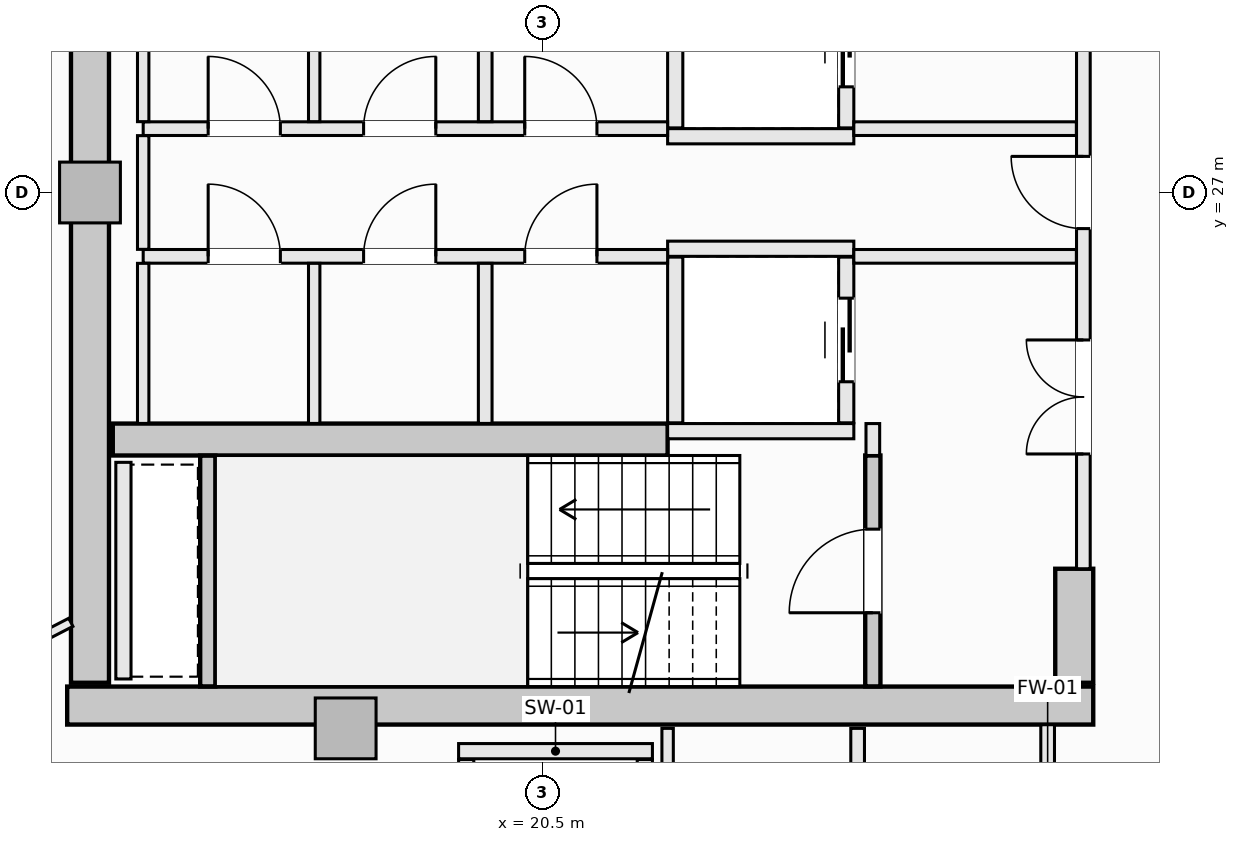
"""IFC4 building model, lengths in metres.
Left out: names, types, materials, properties, quantities, classifications, styles, units other than length and angle.
Written with IfcOpenShell. Run it as: python <this file> out.ifc"""

import sys

from ifc_helpers import new_model, si_unit, direction, frame, frame_2d, origin, origin_2d, place, context, subcontext, project, spatial, rectangle, extrude, element, fill, save


model = new_model("IFC4")
c1 = context("Model", 3, precision=1e-05, world=origin(), true_north=direction((0.0, 1.0)))
c2 = subcontext(c1, "Body", "Model", "MODEL_VIEW")
j1 = project(units=[si_unit("LENGTHUNIT", "METRE"), si_unit("PLANEANGLEUNIT", "RADIAN")], contexts=[c1])
p1 = place(None, origin())
s1 = spatial("IfcSite", under=j1, at=p1, CompositionType="ELEMENT")
p2 = place(p1, origin())
s2 = spatial("IfcBuilding", under=s1, at=p2, CompositionType="ELEMENT")
p3 = place(p2, frame((0.0, 0.0, 216.2)))
s3 = spatial("IfcBuildingStorey", under=s2, at=p3, CompositionType="ELEMENT", Elevation=216.2)
p4 = place(p3, frame((14.25, 20.25, -0.27), z_axis=(0.0, 0.0, 1.0), x_axis=(1.0, 0.0, 0.0)))
e1 = element("IfcWall", 1, at=p4, inside=s3, PredefinedType="SHEAR", context=c2, shape_type="SweptSolid", body=[
    extrude(rectangle(XDim=13.5, YDim=0.5, at=frame_2d((6.75, 0.0))), origin(), (0.0, 0.0, 1.0), 3.3),
])
p5 = place(p3, frame((14.55, 20.55, -0.27), z_axis=(0.0, 0.0, 1.0), x_axis=(0.0, 1.0, 0.0)))
e2 = element("IfcWall", 2, at=p5, inside=s3, PredefinedType="SHEAR", context=c2, shape_type="SweptSolid", body=[
    extrude(rectangle(XDim=12.9, YDim=0.5, at=frame_2d((6.45, 0.0))), origin(), (0.0, 0.0, 1.0), 3.3),
])
p6 = place(p3, frame((27.5, 20.55, -0.27), z_axis=(0.0, 0.0, 1.0), x_axis=(0.0, 1.0, 0.0)))
e3 = element("IfcWall", 3, at=p6, inside=s3, PredefinedType="SHEAR", context=c2, shape_type="SweptSolid", body=[
    extrude(rectangle(XDim=1.5, YDim=0.5, at=frame_2d((0.75, 0.0))), origin(), (0.0, 0.0, 1.0), 3.3),
])
p7 = place(p3, frame((14.85, 23.75, -0.27), z_axis=(0.0, 0.0, 1.0), x_axis=(1.0, 0.0, 0.0)))
e4 = element("IfcWall", 4, at=p7, inside=s3, PredefinedType="SHEAR", context=c2, shape_type="SweptSolid", body=[
    extrude(rectangle(XDim=7.3, YDim=0.42, at=frame_2d((3.65, 0.0))), origin(), (0.0, 0.0, 1.0), 3.3),
])
for number, where, z_axis, x_axis in (
    (5, (14.55, 27.0, -0.27), (0.0, 0.0, 1.0), (1.0, 0.0, 0.0)),
    (6, (17.914, 19.95, -0.27), (0.0, 0.0, 1.0), (1.0, 0.0, 0.0)),
):
    element("IfcColumn", number, at=place(p3, frame(where, z_axis=z_axis, x_axis=x_axis)), inside=s3, PredefinedType="PILASTER", context=c2, shape_type="SweptSolid", body=[
        extrude(rectangle(XDim=0.8, YDim=0.8, at=origin_2d()), origin(), (0.0, 0.0, 1.0), 3.3),
    ])
p8 = place(p3, frame((24.85, 20.502, -0.27), z_axis=(0.0, 0.0, 1.0), x_axis=(0.0, 1.0, 0.0)))
e7 = element("IfcWall", 7, at=p8, inside=s3, PredefinedType="SHEAR", context=c2, shape_type="SweptSolid", body=[
    extrude(rectangle(XDim=3.038, YDim=0.2, at=frame_2d((1.519, 0.0))), origin(), (0.0, 0.0, 1.0), 3.3),
])
p9 = place(p8, frame((0.969, 0.0, 0.27)))
e8 = element("IfcOpeningElement", 8, at=p9, cuts=e7, PredefinedType="OPENING", context=c2, shape_type="SweptSolid", body=[
    extrude(rectangle(XDim=1.1, YDim=2.15, at=frame_2d((0.55, 1.075))), frame((0.0, 0.11, 0.0), z_axis=(0.0, -1.0, 0.0), x_axis=(1.0, 0.0, 0.0)), (0.0, 0.0, 1.0), 0.22),
])
p10 = place(p3, frame((16.1, 20.502, -0.27), z_axis=(0.0, 0.0, 1.0), x_axis=(0.0, 1.0, 0.0)))
e9 = element("IfcWall", 9, at=p10, inside=s3, PredefinedType="SHEAR", context=c2, shape_type="SweptSolid", body=[
    extrude(rectangle(XDim=3.036, YDim=0.2, at=frame_2d((1.518, 0.0))), origin(), (0.0, 0.0, 1.0), 3.3),
])
p11 = place(p3, frame((22.15, 27.74, 0.0), z_axis=(0.0, 0.0, 1.0), x_axis=(1.0, 0.0, 0.0)))
e10 = element("IfcWall", 10, at=p11, inside=s3, PredefinedType="SOLIDWALL", context=c2, shape_type="SweptSolid", body=[
    extrude(rectangle(XDim=2.45, YDim=0.2, at=frame_2d((1.225, 0.0))), origin(), (0.0, 0.0, 1.0), 3.03),
])
p12 = place(p3, frame((22.25, 27.85, 0.0), z_axis=(0.0, 0.0, 1.0), x_axis=(0.0, 1.0, 0.0)))
e11 = element("IfcWall", 11, at=p12, inside=s3, PredefinedType="SOLIDWALL", context=c2, shape_type="SweptSolid", body=[
    extrude(rectangle(XDim=2.18, YDim=0.2, at=frame_2d((1.09, 0.0))), origin(), (0.0, 0.0, 1.0), 3.03),
])
p13 = place(p3, frame((24.5, 27.85, 0.0), z_axis=(0.0, 0.0, 1.0), x_axis=(0.0, 1.0, 0.0)))
e12 = element("IfcWall", 12, at=p13, inside=s3, PredefinedType="SOLIDWALL", context=c2, shape_type="SweptSolid", body=[
    extrude(rectangle(XDim=2.18, YDim=0.2, at=frame_2d((1.09, 0.0))), origin(), (0.0, 0.0, 1.0), 3.03),
])
p14 = place(p13, frame((0.54, 0.0, 0.0)))
e13 = element("IfcOpeningElement", 13, at=p14, cuts=e12, PredefinedType="OPENING", context=c2, shape_type="SweptSolid", body=[
    extrude(rectangle(XDim=1.1, YDim=2.2, at=frame_2d((0.55, 1.1))), frame((0.0, 0.11, 0.0), z_axis=(0.0, -1.0, 0.0), x_axis=(1.0, 0.0, 0.0)), (0.0, 0.0, 1.0), 0.22),
])
for number, where, z_axis, x_axis in (
    (14, (22.15, 26.26, 0.0), (0.0, 0.0, 1.0), (1.0, 0.0, 0.0)),
    (15, (22.15, 23.86, 0.0), (0.0, 0.0, 1.0), (1.0, 0.0, 0.0)),
):
    element("IfcWall", number, at=place(p3, frame(where, z_axis=z_axis, x_axis=x_axis)), inside=s3, PredefinedType="SOLIDWALL", context=c2, shape_type="SweptSolid", body=[
        extrude(rectangle(XDim=2.45, YDim=0.2, at=frame_2d((1.225, 0.0))), origin(), (0.0, 0.0, 1.0), 3.03),
    ])
p15 = place(p3, frame((22.25, 23.97, 0.0), z_axis=(0.0, 0.0, 1.0), x_axis=(0.0, 1.0, 0.0)))
e16 = element("IfcWall", 16, at=p15, inside=s3, PredefinedType="SOLIDWALL", context=c2, shape_type="SweptSolid", body=[
    extrude(rectangle(XDim=2.18, YDim=0.2, at=frame_2d((1.09, 0.0))), origin(), (0.0, 0.0, 1.0), 3.03),
])
p16 = place(p3, frame((24.5, 23.97, 0.0), z_axis=(0.0, 0.0, 1.0), x_axis=(0.0, 1.0, 0.0)))
e17 = element("IfcWall", 17, at=p16, inside=s3, PredefinedType="SOLIDWALL", context=c2, shape_type="SweptSolid", body=[
    extrude(rectangle(XDim=2.18, YDim=0.2, at=frame_2d((1.09, 0.0))), origin(), (0.0, 0.0, 1.0), 3.03),
])
p17 = place(p16, frame((0.54, 0.0, 0.0)))
e18 = element("IfcOpeningElement", 18, at=p17, cuts=e17, PredefinedType="OPENING", context=c2, shape_type="SweptSolid", body=[
    extrude(rectangle(XDim=1.1, YDim=2.2, at=frame_2d((0.55, 1.1))), frame((0.0, 0.11, 0.0), z_axis=(0.0, -1.0, 0.0), x_axis=(1.0, 0.0, 0.0)), (0.0, 0.0, 1.0), 0.22),
])
p18 = place(p3, frame((19.4, 19.65, 0.0), z_axis=(0.0, 0.0, 1.0), x_axis=(1.0, 0.0, 0.0)))
e19 = element("IfcWall", 19, at=p18, inside=s3, PredefinedType="SOLIDWALL", context=c2, shape_type="SweptSolid", body=[
    extrude(rectangle(XDim=2.55, YDim=0.2, at=frame_2d((1.275, 0.0))), origin(), (0.0, 0.0, 1.0), 3.03),
])
for number, where, z_axis, x_axis in (
    (20, (19.5, 17.01, 0.0), (0.0, 0.0, 1.0), (0.0, 1.0, 0.0)),
    (21, (21.85, 17.01, 0.0), (0.0, 0.0, 1.0), (0.0, 1.0, 0.0)),
):
    element("IfcWall", number, at=place(p3, frame(where, z_axis=z_axis, x_axis=x_axis)), inside=s3, PredefinedType="SOLIDWALL", context=c2, shape_type="SweptSolid", body=[
        extrude(rectangle(XDim=2.53, YDim=0.2, at=frame_2d((1.265, 0.0))), origin(), (0.0, 0.0, 1.0), 3.03),
    ])
p19 = place(p3, frame((14.99, 20.6, 0.0), z_axis=(0.0, 0.0, 1.0), x_axis=(0.0, 1.0, 0.0)))
e22 = element("IfcWall", 22, at=p19, inside=s3, PredefinedType="SOLIDWALL", context=c2, shape_type="SweptSolid", body=[
    extrude(rectangle(XDim=2.85, YDim=0.2, at=frame_2d((1.425, 0.0))), origin(), (0.0, 0.0, 1.0), 3.03),
])
p20 = place(p3, frame((24.85, 23.54, 0.0), z_axis=(0.0, 0.0, 1.0), x_axis=(0.0, 1.0, 0.0)))
e23 = element("IfcWall", 23, at=p20, inside=s3, PredefinedType="SOLIDWALL", context=c2, shape_type="SweptSolid", body=[
    extrude(rectangle(XDim=0.42, YDim=0.18, at=frame_2d((0.21, 0.0))), origin(), (0.0, 0.0, 1.0), 3.03),
])
p21 = place(p3, frame((27.62, 22.05, 0.0), z_axis=(0.0, 0.0, 1.0), x_axis=(0.0, 1.0, 0.0)))
e24 = element("IfcWall", 24, at=p21, inside=s3, PredefinedType="SOLIDWALL", context=c2, shape_type="SweptSolid", body=[
    extrude(rectangle(XDim=9.9, YDim=0.18, at=frame_2d((4.95, 0.0))), origin(), (0.0, 0.0, 1.0), 3.03),
])
p22 = place(p21, frame((4.475, 0.0, 0.0)))
e25 = element("IfcOpeningElement", 25, at=p22, cuts=e24, PredefinedType="OPENING", context=c2, shape_type="SweptSolid", body=[
    extrude(rectangle(XDim=0.95, YDim=2.1, at=frame_2d((0.475, 1.05))), frame((0.0, 0.1, 0.0), z_axis=(0.0, -1.0, 0.0), x_axis=(1.0, 0.0, 0.0)), (0.0, 0.0, 1.0), 0.2),
])
p23 = place(p21, frame((6.89, 0.0, 0.0)))
e26 = element("IfcOpeningElement", 26, at=p23, cuts=e24, PredefinedType="OPENING", context=c2, shape_type="SweptSolid", body=[
    extrude(rectangle(XDim=1.5, YDim=2.2, at=frame_2d((0.75, 1.1))), frame((0.0, 0.1, 0.0), z_axis=(0.0, -1.0, 0.0), x_axis=(1.0, 0.0, 0.0)), (0.0, 0.0, 1.0), 0.2),
])
p24 = place(p21, frame((1.51, 0.0, 0.0)))
e27 = element("IfcOpeningElement", 27, at=p24, cuts=e24, PredefinedType="OPENING", context=c2, shape_type="SweptSolid", body=[
    extrude(rectangle(XDim=1.5, YDim=2.2, at=frame_2d((0.75, 1.1))), frame((0.0, 0.1, 0.0), z_axis=(0.0, -1.0, 0.0), x_axis=(1.0, 0.0, 0.0)), (0.0, 0.0, 1.0), 0.2),
])
p25 = place(p3, frame((15.25, 27.84, 0.0), z_axis=(0.0, 0.0, 1.0), x_axis=(1.0, 0.0, 0.0)))
e28 = element("IfcWall", 28, at=p25, inside=s3, PredefinedType="SOLIDWALL", context=c2, shape_type="SweptSolid", body=[
    extrude(rectangle(XDim=6.9, YDim=0.18, at=frame_2d((3.45, 0.0))), origin(), (0.0, 0.0, 1.0), 3.03),
])
p26 = place(p25, frame((5.02, 0.0, 0.0)))
e29 = element("IfcOpeningElement", 29, at=p26, cuts=e28, PredefinedType="OPENING", context=c2, shape_type="SweptSolid", body=[
    extrude(rectangle(XDim=0.95, YDim=2.1, at=frame_2d((0.475, 1.05))), frame((0.0, 0.1, 0.0), z_axis=(0.0, -1.0, 0.0), x_axis=(1.0, 0.0, 0.0)), (0.0, 0.0, 1.0), 0.2),
])
p27 = place(p25, frame((0.855, 0.0, 0.0)))
e30 = element("IfcOpeningElement", 30, at=p27, cuts=e28, PredefinedType="OPENING", context=c2, shape_type="SweptSolid", body=[
    extrude(rectangle(XDim=0.95, YDim=2.1, at=frame_2d((0.475, 1.05))), frame((0.0, 0.1, 0.0), z_axis=(0.0, -1.0, 0.0), x_axis=(1.0, 0.0, 0.0)), (0.0, 0.0, 1.0), 0.2),
])
p28 = place(p25, frame((2.9, 0.0, 0.0)))
e31 = element("IfcOpeningElement", 31, at=p28, cuts=e28, PredefinedType="OPENING", context=c2, shape_type="SweptSolid", body=[
    extrude(rectangle(XDim=0.95, YDim=2.1, at=frame_2d((0.475, 1.05))), frame((0.0, 0.1, 0.0), z_axis=(0.0, -1.0, 0.0), x_axis=(1.0, 0.0, 0.0)), (0.0, 0.0, 1.0), 0.2),
])
p29 = place(p3, frame((24.6, 27.84, 0.0), z_axis=(0.0, 0.0, 1.0), x_axis=(1.0, 0.0, 0.0)))
e32 = element("IfcWall", 32, at=p29, inside=s3, PredefinedType="SOLIDWALL", context=c2, shape_type="SweptSolid", body=[
    extrude(rectangle(XDim=2.928, YDim=0.18, at=frame_2d((1.464, 0.0))), origin(), (0.0, 0.0, 1.0), 3.03),
])
p30 = place(p3, frame((15.25, 26.16, 0.0), z_axis=(0.0, 0.0, 1.0), x_axis=(1.0, 0.0, 0.0)))
e33 = element("IfcWall", 33, at=p30, inside=s3, PredefinedType="SOLIDWALL", context=c2, shape_type="SweptSolid", body=[
    extrude(rectangle(XDim=6.9, YDim=0.18, at=frame_2d((3.45, 0.0))), origin(), (0.0, 0.0, 1.0), 3.03),
])
p31 = place(p30, frame((5.02, 0.0, 0.0)))
e34 = element("IfcOpeningElement", 34, at=p31, cuts=e33, PredefinedType="OPENING", context=c2, shape_type="SweptSolid", body=[
    extrude(rectangle(XDim=0.95, YDim=2.1, at=frame_2d((0.475, 1.05))), frame((0.0, 0.1, 0.0), z_axis=(0.0, -1.0, 0.0), x_axis=(1.0, 0.0, 0.0)), (0.0, 0.0, 1.0), 0.2),
])
p32 = place(p30, frame((0.855, 0.0, 0.0)))
e35 = element("IfcOpeningElement", 35, at=p32, cuts=e33, PredefinedType="OPENING", context=c2, shape_type="SweptSolid", body=[
    extrude(rectangle(XDim=0.95, YDim=2.1, at=frame_2d((0.475, 1.05))), frame((0.0, 0.1, 0.0), z_axis=(0.0, -1.0, 0.0), x_axis=(1.0, 0.0, 0.0)), (0.0, 0.0, 1.0), 0.2),
])
p33 = place(p30, frame((2.9, 0.0, 0.0)))
e36 = element("IfcOpeningElement", 36, at=p33, cuts=e33, PredefinedType="OPENING", context=c2, shape_type="SweptSolid", body=[
    extrude(rectangle(XDim=0.95, YDim=2.1, at=frame_2d((0.475, 1.05))), frame((0.0, 0.1, 0.0), z_axis=(0.0, -1.0, 0.0), x_axis=(1.0, 0.0, 0.0)), (0.0, 0.0, 1.0), 0.2),
])
p34 = place(p3, frame((24.6, 26.16, 0.0), z_axis=(0.0, 0.0, 1.0), x_axis=(1.0, 0.0, 0.0)))
e37 = element("IfcWall", 37, at=p34, inside=s3, PredefinedType="SOLIDWALL", context=c2, shape_type="SweptSolid", body=[
    extrude(rectangle(XDim=2.928, YDim=0.18, at=frame_2d((1.464, 0.0))), origin(), (0.0, 0.0, 1.0), 3.03),
])
p35 = place(p3, frame((15.25, 23.962, 0.0), z_axis=(0.0, 0.0, 1.0), x_axis=(0.0, 1.0, 0.0)))
e38 = element("IfcWall", 38, at=p35, inside=s3, PredefinedType="PARTITIONING", context=c2, shape_type="SweptSolid", body=[
    extrude(rectangle(XDim=2.106, YDim=0.15, at=frame_2d((1.053, 0.0))), origin(), (0.0, 0.0, 1.0), 3.03),
])
p36 = place(p3, frame((15.25, 26.252, 0.0), z_axis=(0.0, 0.0, 1.0), x_axis=(0.0, 1.0, 0.0)))
e39 = element("IfcWall", 39, at=p36, inside=s3, PredefinedType="PARTITIONING", context=c2, shape_type="SweptSolid", body=[
    extrude(rectangle(XDim=1.496, YDim=0.15, at=frame_2d((0.748, 0.0))), origin(), (0.0, 0.0, 1.0), 3.03),
])
p37 = place(p3, frame((15.25, 27.932, 0.0), z_axis=(0.0, 0.0, 1.0), x_axis=(0.0, 1.0, 0.0)))
e40 = element("IfcWall", 40, at=p37, inside=s3, PredefinedType="PARTITIONING", context=c2, shape_type="SweptSolid", body=[
    extrude(rectangle(XDim=2.106, YDim=0.15, at=frame_2d((1.053, 0.0))), origin(), (0.0, 0.0, 1.0), 3.03),
])
for number, where, z_axis, x_axis in (
    (41, (19.75, 23.962, 0.0), (0.0, 0.0, 1.0), (0.0, 1.0, 0.0)),
    (42, (19.75, 27.932, 0.0), (0.0, 0.0, 1.0), (0.0, 1.0, 0.0)),
):
    element("IfcWall", number, at=place(p3, frame(where, z_axis=z_axis, x_axis=x_axis)), inside=s3, PredefinedType="SOLIDWALL", context=c2, shape_type="SweptSolid", body=[
        extrude(rectangle(XDim=2.106, YDim=0.18, at=frame_2d((1.053, 0.0))), origin(), (0.0, 0.0, 1.0), 3.03),
    ])
for number, where, z_axis, x_axis in (
    (43, (17.5, 23.962, 0.0), (0.0, 0.0, 1.0), (0.0, 1.0, 0.0)),
    (44, (17.5, 27.932, 0.0), (0.0, 0.0, 1.0), (0.0, 1.0, 0.0)),
):
    element("IfcWall", number, at=place(p3, frame(where, z_axis=z_axis, x_axis=x_axis)), inside=s3, PredefinedType="PARTITIONING", context=c2, shape_type="SweptSolid", body=[
        extrude(rectangle(XDim=2.106, YDim=0.15, at=frame_2d((1.053, 0.0))), origin(), (0.0, 0.0, 1.0), 3.03),
    ])
p38 = place(p3, frame((22.15, 17.142, 0.0), z_axis=(0.0, 0.0, 1.0), x_axis=(0.0, 1.0, 0.0)))
e45 = element("IfcWall", 45, at=p38, inside=s3, PredefinedType="PARTITIONING", context=c2, shape_type="SweptSolid", body=[
    extrude(rectangle(XDim=2.808, YDim=0.15, at=frame_2d((1.404, 0.0))), origin(), (0.0, 0.0, 1.0), 3.03),
])
p39 = place(p3, frame((24.65, 17.142, 0.0), z_axis=(0.0, 0.0, 1.0), x_axis=(0.0, 1.0, 0.0)))
e46 = element("IfcWall", 46, at=p39, inside=s3, PredefinedType="SOLIDWALL", context=c2, shape_type="SweptSolid", body=[
    extrude(rectangle(XDim=2.808, YDim=0.18, at=frame_2d((1.404, 0.0))), origin(), (0.0, 0.0, 1.0), 3.03),
])
p40 = place(p39, frame((0.929, 0.0, 0.0)))
e47 = element("IfcOpeningElement", 47, at=p40, cuts=e46, PredefinedType="OPENING", context=c2, shape_type="SweptSolid", body=[
    extrude(rectangle(XDim=0.95, YDim=2.1, at=frame_2d((0.475, 1.05))), frame((0.0, 0.1, 0.0), z_axis=(0.0, -1.0, 0.0), x_axis=(1.0, 0.0, 0.0)), (0.0, 0.0, 1.0), 0.2),
])
p41 = place(p3, frame((27.15, 17.142, 0.0), z_axis=(0.0, 0.0, 1.0), x_axis=(0.0, 1.0, 0.0)))
e48 = element("IfcWall", 48, at=p41, inside=s3, PredefinedType="SOLIDWALL", context=c2, shape_type="SweptSolid", body=[
    extrude(rectangle(XDim=2.856, YDim=0.18, at=frame_2d((1.428, 0.0))), origin(), (0.0, 0.0, 1.0), 3.03),
])
p42 = place(p41, frame((0.953, 0.0, 0.0)))
e49 = element("IfcOpeningElement", 49, at=p42, cuts=e48, PredefinedType="OPENING", context=c2, shape_type="SweptSolid", body=[
    extrude(rectangle(XDim=0.95, YDim=2.1, at=frame_2d((0.475, 1.05))), frame((0.0, 0.1, 0.0), z_axis=(0.0, -1.0, 0.0), x_axis=(1.0, 0.0, 0.0)), (0.0, 0.0, 1.0), 0.2),
])
p43 = place(p3, frame((8.274, 18.235, 0.0), z_axis=(0.0, 0.0, 1.0), x_axis=(0.888553888563, 0.458772260625, 0.0)))
e50 = element("IfcWall", 50, at=p43, inside=s3, PredefinedType="PARTITIONING", context=c2, shape_type="SweptSolid", body=[
    extrude(rectangle(XDim=6.779, YDim=0.12, at=frame_2d((3.39, 0.0))), origin(), (0.0, 0.0, 1.0), 3.03),
])
p44 = place(p9, origin())
e51 = element("IfcDoor", 51, at=p44, inside=s3, OperationType="SINGLE_SWING_LEFT", PredefinedType="DOOR", context=c2, shape_type="SweptSolid", body=[
    extrude(rectangle(XDim=1.1, YDim=2.15, at=frame_2d((0.55, 1.075))), frame((0.0, 0.025, 0.0), z_axis=(0.0, -1.0, 0.0), x_axis=(1.0, 0.0, 0.0)), (0.0, 0.0, 1.0), 0.05),
])
fill(e8, e51)
p45 = place(p14, origin())
e52 = element("IfcDoor", 52, at=p45, inside=s3, OperationType="SLIDING_TO_LEFT", PredefinedType="DOOR", context=c2, shape_type="SweptSolid", body=[
    extrude(rectangle(XDim=1.1, YDim=2.2, at=frame_2d((0.55, 1.1))), frame((0.0, 0.025, 0.0), z_axis=(0.0, -1.0, 0.0), x_axis=(1.0, 0.0, 0.0)), (0.0, 0.0, 1.0), 0.05),
])
fill(e13, e52)
p46 = place(p17, origin())
e53 = element("IfcDoor", 53, at=p46, inside=s3, OperationType="SLIDING_TO_LEFT", PredefinedType="DOOR", context=c2, shape_type="SweptSolid", body=[
    extrude(rectangle(XDim=1.1, YDim=2.2, at=frame_2d((0.55, 1.1))), frame((0.0, 0.025, 0.0), z_axis=(0.0, -1.0, 0.0), x_axis=(1.0, 0.0, 0.0)), (0.0, 0.0, 1.0), 0.05),
])
fill(e18, e53)
p47 = place(p22, origin())
e54 = element("IfcDoor", 54, at=p47, inside=s3, OperationType="SINGLE_SWING_RIGHT", PredefinedType="DOOR", context=c2, shape_type="SweptSolid", body=[
    extrude(rectangle(XDim=0.95, YDim=2.1, at=frame_2d((0.475, 1.05))), frame((0.0, 0.025, 0.0), z_axis=(0.0, -1.0, 0.0), x_axis=(1.0, 0.0, 0.0)), (0.0, 0.0, 1.0), 0.05),
])
fill(e25, e54)
p48 = place(p24, origin())
e55 = element("IfcDoor", 55, at=p48, inside=s3, OperationType="DOUBLE_DOOR_SINGLE_SWING", PredefinedType="DOOR", context=c2, shape_type="SweptSolid", body=[
    extrude(rectangle(XDim=1.5, YDim=2.2, at=frame_2d((0.75, 1.1))), frame((0.0, 0.025, 0.0), z_axis=(0.0, -1.0, 0.0), x_axis=(1.0, 0.0, 0.0)), (0.0, 0.0, 1.0), 0.05),
])
fill(e27, e55)
p49 = place(p26, origin())
e56 = element("IfcDoor", 56, at=p49, inside=s3, OperationType="SINGLE_SWING_LEFT", PredefinedType="DOOR", context=c2, shape_type="SweptSolid", body=[
    extrude(rectangle(XDim=0.95, YDim=2.1, at=frame_2d((0.475, 1.05))), frame((0.0, 0.025, 0.0), z_axis=(0.0, -1.0, 0.0), x_axis=(1.0, 0.0, 0.0)), (0.0, 0.0, 1.0), 0.05),
])
fill(e29, e56)
p50 = place(p31, origin())
e57 = element("IfcDoor", 57, at=p50, inside=s3, OperationType="SINGLE_SWING_RIGHT", PredefinedType="DOOR", context=c2, shape_type="SweptSolid", body=[
    extrude(rectangle(XDim=0.95, YDim=2.1, at=frame_2d((0.475, 1.05))), frame((0.0, 0.025, 0.0), z_axis=(0.0, -1.0, 0.0), x_axis=(1.0, 0.0, 0.0)), (0.0, 0.0, 1.0), 0.05),
])
fill(e34, e57)
p51 = place(p27, origin())
e58 = element("IfcDoor", 58, at=p51, inside=s3, OperationType="SINGLE_SWING_LEFT", PredefinedType="DOOR", context=c2, shape_type="SweptSolid", body=[
    extrude(rectangle(XDim=0.95, YDim=2.1, at=frame_2d((0.475, 1.05))), frame((0.0, 0.025, 0.0), z_axis=(0.0, -1.0, 0.0), x_axis=(1.0, 0.0, 0.0)), (0.0, 0.0, 1.0), 0.05),
])
fill(e30, e58)
p52 = place(p28, origin())
e59 = element("IfcDoor", 59, at=p52, inside=s3, OperationType="SINGLE_SWING_RIGHT", PredefinedType="DOOR", context=c2, shape_type="SweptSolid", body=[
    extrude(rectangle(XDim=0.95, YDim=2.1, at=frame_2d((0.475, 1.05))), frame((0.0, 0.025, 0.0), z_axis=(0.0, -1.0, 0.0), x_axis=(1.0, 0.0, 0.0)), (0.0, 0.0, 1.0), 0.05),
])
fill(e31, e59)
p53 = place(p32, origin())
e60 = element("IfcDoor", 60, at=p53, inside=s3, OperationType="SINGLE_SWING_LEFT", PredefinedType="DOOR", context=c2, shape_type="SweptSolid", body=[
    extrude(rectangle(XDim=0.95, YDim=2.1, at=frame_2d((0.475, 1.05))), frame((0.0, 0.025, 0.0), z_axis=(0.0, -1.0, 0.0), x_axis=(1.0, 0.0, 0.0)), (0.0, 0.0, 1.0), 0.05),
])
fill(e35, e60)
p54 = place(p33, origin())
e61 = element("IfcDoor", 61, at=p54, inside=s3, OperationType="SINGLE_SWING_RIGHT", PredefinedType="DOOR", context=c2, shape_type="SweptSolid", body=[
    extrude(rectangle(XDim=0.95, YDim=2.1, at=frame_2d((0.475, 1.05))), frame((0.0, 0.025, 0.0), z_axis=(0.0, -1.0, 0.0), x_axis=(1.0, 0.0, 0.0)), (0.0, 0.0, 1.0), 0.05),
])
fill(e36, e61)
save(model, sys.argv[1])
